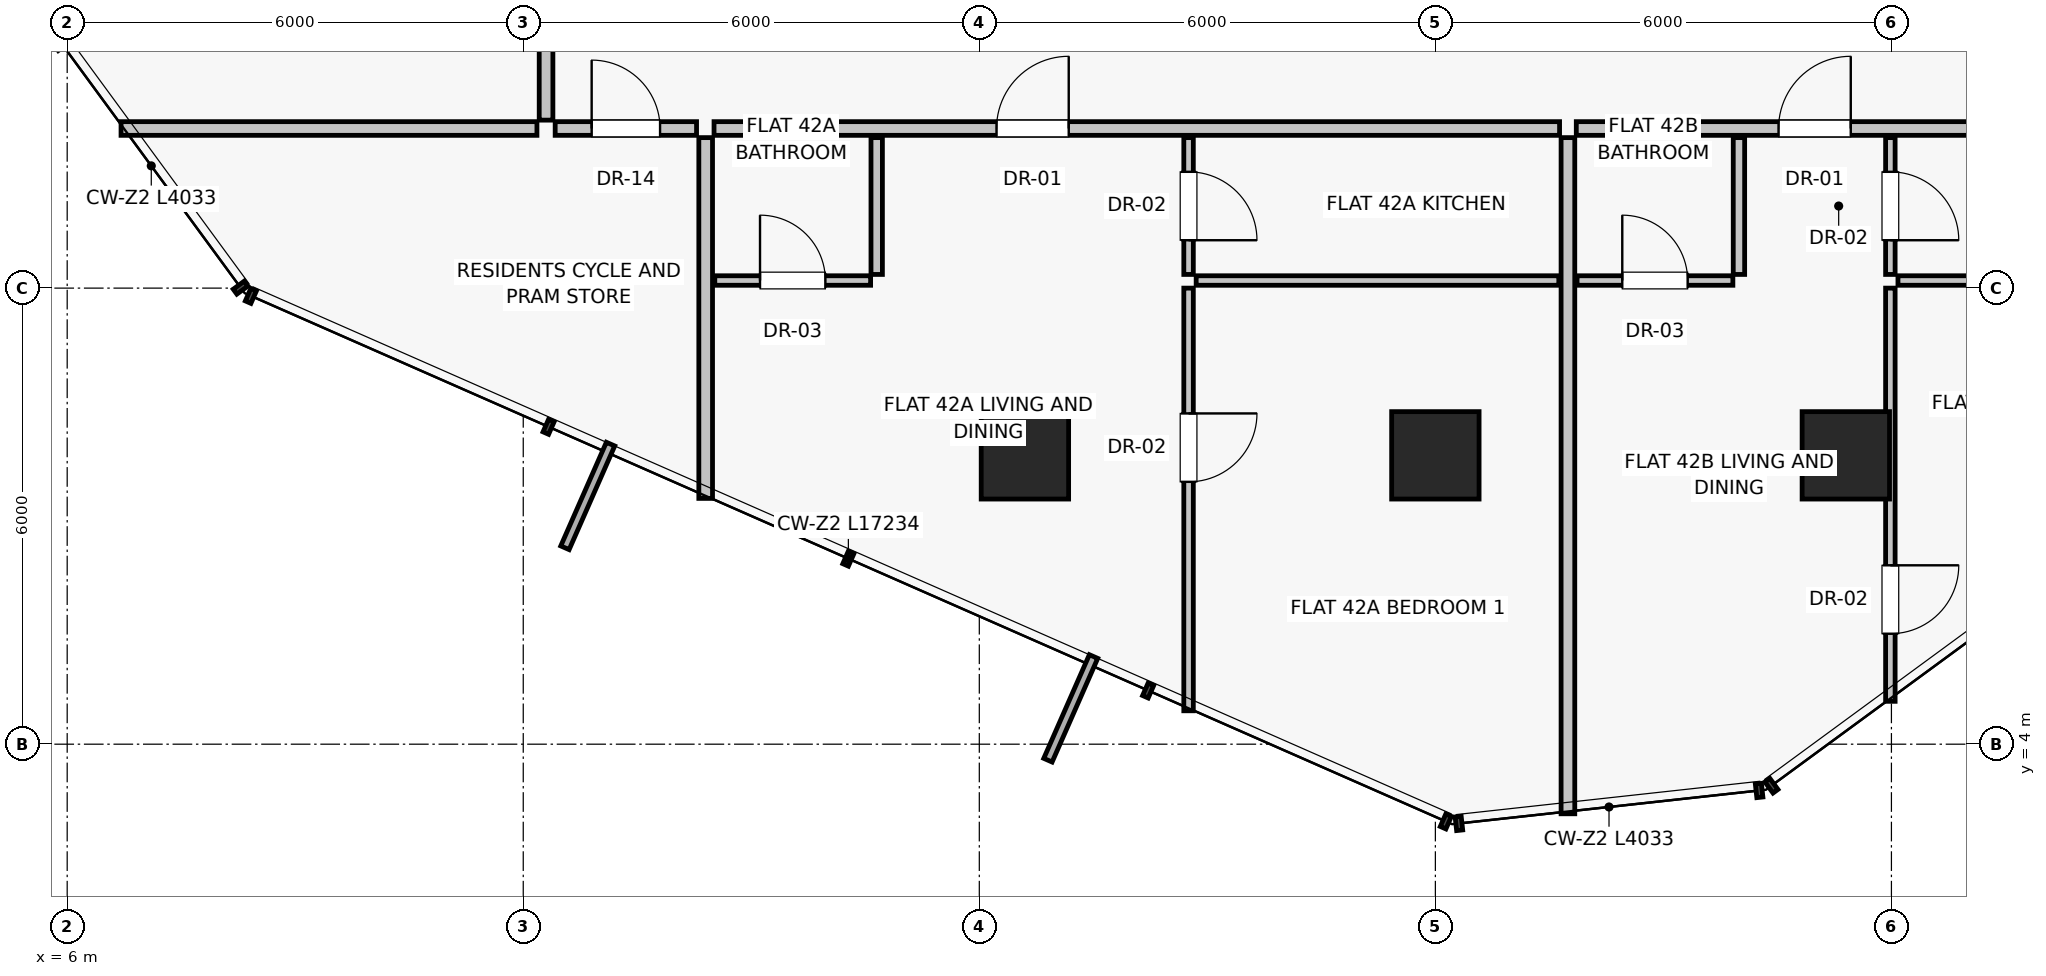
"""IFC4 building model, lengths in metres.
Left out: names, types, materials, properties, quantities, classifications, styles, units other than length and angle.
Written with IfcOpenShell. Run it as: python <this file> out.ifc"""

import sys

from ifc_helpers import new_model, si_unit, direction, frame, frame_2d, origin, origin_2d, place, context, subcontext, project, spatial, rectangle, extrude, source, transform, mapped, element, fill, save


model = new_model("IFC4")
c1 = context("Model", 3, precision=1e-05, world=origin(), true_north=direction((0.0, 1.0)))
c2 = subcontext(c1, "Body", "Model", "MODEL_VIEW")
j1 = project(units=[si_unit("LENGTHUNIT", "METRE"), si_unit("PLANEANGLEUNIT", "RADIAN")], contexts=[c1])
p1 = place(None, origin())
s1 = spatial("IfcSite", under=j1, at=p1, CompositionType="ELEMENT")
p2 = place(p1, origin())
s2 = spatial("IfcBuilding", under=s1, at=p2, CompositionType="ELEMENT")
p3 = place(p2, frame((0.0, 0.0, 149.0)))
s3 = spatial("IfcBuildingStorey", under=s2, at=p3, CompositionType="ELEMENT", Elevation=149.0)
for number, where, z_axis, x_axis in (
    (1, (18.6, 7.8, 0.0), (0.0, 0.0, 1.0), (1.0, 0.0, 0.0)),
    (2, (24.0, 7.8, 0.0), (0.0, 0.0, 1.0), (1.0, 0.0, 0.0)),
    (3, (29.4, 7.8, 0.0), (0.0, 0.0, 1.0), (1.0, 0.0, 0.0)),
):
    element("IfcColumn", number, at=place(p3, frame(where, z_axis=z_axis, x_axis=x_axis)), inside=s3, PredefinedType="COLUMN", context=c2, shape_type="SweptSolid", body=[
        extrude(rectangle(XDim=1.15, YDim=1.15, at=origin_2d()), origin(), (0.0, 0.0, 1.0), 3.25),
    ])
p4 = place(p3, frame((14.4, 11.98, 0.0), z_axis=(0.0, 0.0, 1.0), x_axis=(0.0, -1.0, 0.0)))
e4 = element("IfcWall", 4, at=p4, inside=s3, PredefinedType="PARTITIONING", context=c2, shape_type="SweptSolid", body=[
    extrude(rectangle(XDim=4.746, YDim=0.18, at=frame_2d((2.373, 0.0))), origin(), (0.0, 0.0, 1.0), 3.0),
])
p5 = place(p3, frame((14.51, 12.1, 0.0), z_axis=(0.0, 0.0, 1.0), x_axis=(1.0, 0.0, 0.0)))
e5 = element("IfcWall", 5, at=p5, inside=s3, PredefinedType="PARTITIONING", context=c2, shape_type="SweptSolid", body=[
    extrude(rectangle(XDim=11.124, YDim=0.18, at=frame_2d((5.562, 0.0))), origin(), (0.0, 0.0, 1.0), 2.58),
])
p6 = place(p5, frame((3.717, 0.0, 0.0)))
e6 = element("IfcOpeningElement", 6, at=p6, cuts=e5, PredefinedType="OPENING", context=c2, shape_type="SweptSolid", body=[
    extrude(rectangle(XDim=0.95, YDim=2.02, at=frame_2d((0.475, 1.01))), frame((0.0, 0.1, 0.0), z_axis=(0.0, -1.0, 0.0), x_axis=(1.0, 0.0, 0.0)), (0.0, 0.0, 1.0), 0.2),
])
p7 = place(p3, frame((16.65, 11.98, 0.0), z_axis=(0.0, 0.0, 1.0), x_axis=(0.0, -1.0, 0.0)))
e7 = element("IfcWall", 7, at=p7, inside=s3, PredefinedType="PARTITIONING", context=c2, shape_type="SweptSolid", body=[
    extrude(rectangle(XDim=1.8, YDim=0.15, at=frame_2d((0.9, 0.0))), origin(), (0.0, 0.0, 1.0), 3.0),
])
p8 = place(p3, frame((14.52, 10.1, 0.0), z_axis=(0.0, 0.0, 1.0), x_axis=(1.0, 0.0, 0.0)))
e8 = element("IfcWall", 8, at=p8, inside=s3, PredefinedType="PARTITIONING", context=c2, shape_type="SweptSolid", body=[
    extrude(rectangle(XDim=2.05, YDim=0.125, at=frame_2d((1.025, 0.0))), origin(), (0.0, 0.0, 1.0), 3.0),
])
p9 = place(p8, frame((0.595, 0.0, 0.0)))
e9 = element("IfcOpeningElement", 9, at=p9, cuts=e8, PredefinedType="OPENING", context=c2, shape_type="SweptSolid", body=[
    extrude(rectangle(XDim=0.86, YDim=2.01, at=frame_2d((0.43, 1.005))), frame((0.0, 0.073, 0.0), z_axis=(0.0, -1.0, 0.0), x_axis=(1.0, 0.0, 0.0)), (0.0, 0.0, 1.0), 0.145),
])
p10 = place(p3, frame((20.753, 11.98, 0.0), z_axis=(0.0, 0.0, 1.0), x_axis=(0.0, -1.0, 0.0)))
e10 = element("IfcWall", 10, at=p10, inside=s3, PredefinedType="PARTITIONING", context=c2, shape_type="SweptSolid", body=[
    extrude(rectangle(XDim=1.8, YDim=0.125, at=frame_2d((0.9, 0.0))), origin(), (0.0, 0.0, 1.0), 3.0),
])
p11 = place(p10, frame((0.45, 0.0, 0.0)))
e11 = element("IfcOpeningElement", 11, at=p11, cuts=e10, PredefinedType="OPENING", context=c2, shape_type="SweptSolid", body=[
    extrude(rectangle(XDim=0.9, YDim=2.01, at=frame_2d((0.45, 1.005))), frame((0.0, 0.073, 0.0), z_axis=(0.0, -1.0, 0.0), x_axis=(1.0, 0.0, 0.0)), (0.0, 0.0, 1.0), 0.145),
])
p12 = place(p3, frame((20.853, 10.1, 0.0), z_axis=(0.0, 0.0, 1.0), x_axis=(1.0, 0.0, 0.0)))
e12 = element("IfcWall", 12, at=p12, inside=s3, PredefinedType="PARTITIONING", context=c2, shape_type="SweptSolid", body=[
    extrude(rectangle(XDim=4.771, YDim=0.125, at=frame_2d((2.385, 0.0))), origin(), (0.0, 0.0, 1.0), 3.0),
])
p13 = place(p3, frame((20.753, 10.0, 0.0), z_axis=(0.0, 0.0, 1.0), x_axis=(0.0, -1.0, 0.0)))
e13 = element("IfcWall", 13, at=p13, inside=s3, PredefinedType="PARTITIONING", context=c2, shape_type="SweptSolid", body=[
    extrude(rectangle(XDim=5.561, YDim=0.125, at=frame_2d((2.78, 0.0))), origin(), (0.0, 0.0, 1.0), 3.0),
])
p14 = place(p13, frame((1.649, 0.0, 0.0)))
e14 = element("IfcOpeningElement", 14, at=p14, cuts=e13, PredefinedType="OPENING", context=c2, shape_type="SweptSolid", body=[
    extrude(rectangle(XDim=0.9, YDim=2.01, at=frame_2d((0.45, 1.005))), frame((0.0, 0.073, 0.0), z_axis=(0.0, -1.0, 0.0), x_axis=(1.0, 0.0, 0.0)), (0.0, 0.0, 1.0), 0.145),
])
p15 = place(p3, frame((25.744, 11.98, 0.0), z_axis=(0.0, 0.0, 1.0), x_axis=(0.0, -1.0, 0.0)))
e15 = element("IfcWall", 15, at=p15, inside=s3, PredefinedType="PARTITIONING", context=c2, shape_type="SweptSolid", body=[
    extrude(rectangle(XDim=8.896, YDim=0.18, at=frame_2d((4.448, 0.0))), origin(), (0.0, 0.0, 1.0), 3.0),
])
p16 = place(p3, frame((25.854, 12.1, 0.0), z_axis=(0.0, 0.0, 1.0), x_axis=(1.0, 0.0, 0.0)))
e16 = element("IfcWall", 16, at=p16, inside=s3, PredefinedType="PARTITIONING", context=c2, shape_type="SweptSolid", body=[
    extrude(rectangle(XDim=7.636, YDim=0.18, at=frame_2d((3.818, 0.0))), origin(), (0.0, 0.0, 1.0), 2.58),
])
p17 = place(p16, frame((2.661, 0.0, 0.0)))
e17 = element("IfcOpeningElement", 17, at=p17, cuts=e16, PredefinedType="OPENING", context=c2, shape_type="SweptSolid", body=[
    extrude(rectangle(XDim=0.95, YDim=2.02, at=frame_2d((0.475, 1.01))), frame((0.0, 0.1, 0.0), z_axis=(0.0, -1.0, 0.0), x_axis=(1.0, 0.0, 0.0)), (0.0, 0.0, 1.0), 0.2),
])
p18 = place(p3, frame((27.994, 11.98, 0.0), z_axis=(0.0, 0.0, 1.0), x_axis=(0.0, -1.0, 0.0)))
e18 = element("IfcWall", 18, at=p18, inside=s3, PredefinedType="PARTITIONING", context=c2, shape_type="SweptSolid", body=[
    extrude(rectangle(XDim=1.8, YDim=0.15, at=frame_2d((0.9, 0.0))), origin(), (0.0, 0.0, 1.0), 3.0),
])
p19 = place(p3, frame((25.864, 10.1, 0.0), z_axis=(0.0, 0.0, 1.0), x_axis=(1.0, 0.0, 0.0)))
e19 = element("IfcWall", 19, at=p19, inside=s3, PredefinedType="PARTITIONING", context=c2, shape_type="SweptSolid", body=[
    extrude(rectangle(XDim=2.05, YDim=0.125, at=frame_2d((1.025, 0.0))), origin(), (0.0, 0.0, 1.0), 3.0),
])
p20 = place(p19, frame((0.595, 0.0, 0.0)))
e20 = element("IfcOpeningElement", 20, at=p20, cuts=e19, PredefinedType="OPENING", context=c2, shape_type="SweptSolid", body=[
    extrude(rectangle(XDim=0.86, YDim=2.01, at=frame_2d((0.43, 1.005))), frame((0.0, 0.073, 0.0), z_axis=(0.0, -1.0, 0.0), x_axis=(1.0, 0.0, 0.0)), (0.0, 0.0, 1.0), 0.145),
])
p21 = place(p3, frame((29.986, 11.98, 0.0), z_axis=(0.0, 0.0, 1.0), x_axis=(0.0, -1.0, 0.0)))
e21 = element("IfcWall", 21, at=p21, inside=s3, PredefinedType="PARTITIONING", context=c2, shape_type="SweptSolid", body=[
    extrude(rectangle(XDim=1.8, YDim=0.125, at=frame_2d((0.9, 0.0))), origin(), (0.0, 0.0, 1.0), 2.378),
])
p22 = place(p21, frame((0.45, 0.0, 0.0)))
e22 = element("IfcOpeningElement", 22, at=p22, cuts=e21, PredefinedType="OPENING", context=c2, shape_type="SweptSolid", body=[
    extrude(rectangle(XDim=0.9, YDim=2.01, at=frame_2d((0.45, 1.005))), frame((0.0, 0.073, 0.0), z_axis=(0.0, -1.0, 0.0), x_axis=(1.0, 0.0, 0.0)), (0.0, 0.0, 1.0), 0.145),
])
p23 = place(p3, frame((30.086, 10.1, 0.0), z_axis=(0.0, 0.0, 1.0), x_axis=(1.0, 0.0, 0.0)))
e23 = element("IfcWall", 23, at=p23, inside=s3, PredefinedType="PARTITIONING", context=c2, shape_type="SweptSolid", body=[
    extrude(rectangle(XDim=3.394, YDim=0.125, at=frame_2d((1.697, 0.0))), origin(), (0.0, 0.0, 1.0), 3.0),
])
p24 = place(p3, frame((29.986, 10.0, 0.0), z_axis=(0.0, 0.0, 1.0), x_axis=(0.0, -1.0, 0.0)))
e24 = element("IfcWall", 24, at=p24, inside=s3, PredefinedType="PARTITIONING", context=c2, shape_type="SweptSolid", body=[
    extrude(rectangle(XDim=5.436, YDim=0.125, at=frame_2d((2.718, 0.0))), origin(), (0.0, 0.0, 1.0), 2.378),
])
p25 = place(p24, frame((3.647, 0.0, 0.0)))
e25 = element("IfcOpeningElement", 25, at=p25, cuts=e24, PredefinedType="OPENING", context=c2, shape_type="SweptSolid", body=[
    extrude(rectangle(XDim=0.9, YDim=2.01, at=frame_2d((0.45, 1.005))), frame((0.0, 0.073, 0.0), z_axis=(0.0, -1.0, 0.0), x_axis=(1.0, 0.0, 0.0)), (0.0, 0.0, 1.0), 0.145),
])
p26 = place(p3, frame((12.18, 12.1, 0.0), z_axis=(0.0, 0.0, 1.0), x_axis=(-1.0, 0.0, 0.0)))
e26 = element("IfcWall", 26, at=p26, inside=s3, PredefinedType="PARTITIONING", context=c2, shape_type="SweptSolid", body=[
    extrude(rectangle(XDim=5.471, YDim=0.18, at=frame_2d((2.736, 0.0))), origin(), (0.0, 0.0, 1.0), 3.0),
])
p27 = place(p3, frame((12.3, 12.21, 0.0), z_axis=(0.0, 0.0, 1.0), x_axis=(0.0, 1.0, 0.0)))
e27 = element("IfcWall", 27, at=p27, inside=s3, PredefinedType="PARTITIONING", context=c2, shape_type="SweptSolid", body=[
    extrude(rectangle(XDim=5.044, YDim=0.18, at=frame_2d((2.522, 0.0))), origin(), (0.0, 0.0, 1.0), 3.0),
])
p28 = place(p27, frame((2.022, 0.0, 0.0)))
e28 = element("IfcOpeningElement", 28, at=p28, cuts=e27, PredefinedType="OPENING", context=c2, shape_type="SweptSolid", body=[
    extrude(rectangle(XDim=1.0, YDim=2.01, at=frame_2d((0.5, 1.005))), frame((0.0, 0.1, 0.0), z_axis=(0.0, -1.0, 0.0), x_axis=(1.0, 0.0, 0.0)), (0.0, 0.0, 1.0), 0.2),
])
p29 = place(p3, frame((12.42, 12.1, 0.0), z_axis=(0.0, 0.0, 1.0), x_axis=(1.0, 0.0, 0.0)))
e29 = element("IfcWall", 29, at=p29, inside=s3, PredefinedType="PARTITIONING", context=c2, shape_type="SweptSolid", body=[
    extrude(rectangle(XDim=1.86, YDim=0.18, at=frame_2d((0.93, 0.0))), origin(), (0.0, 0.0, 1.0), 3.0),
])
p30 = place(p29, frame((0.48, 0.0, 0.0)))
e30 = element("IfcOpeningElement", 30, at=p30, cuts=e29, PredefinedType="OPENING", context=c2, shape_type="SweptSolid", body=[
    extrude(rectangle(XDim=0.9, YDim=2.01, at=frame_2d((0.45, 1.005))), frame((0.0, 0.1, 0.0), z_axis=(0.0, -1.0, 0.0), x_axis=(1.0, 0.0, 0.0)), (0.0, 0.0, 1.0), 0.2),
])
m1 = source(origin(), c2, "Body", "SweptSolid", [
    extrude(rectangle(XDim=0.95, YDim=2.02, at=frame_2d((0.475, 1.01))), frame((0.0, 0.025, 0.0), z_axis=(0.0, -1.0, 0.0), x_axis=(1.0, 0.0, 0.0)), (0.0, 0.0, 1.0), 0.05),
])
p31 = place(p6, origin())
e31 = element("IfcDoor", 31, at=p31, inside=s3, OperationType="SINGLE_SWING_RIGHT", PredefinedType="DOOR", context=c2, shape_type="MappedRepresentation", body=[
    mapped(m1, transform((0.0, 0.0, 0.0), scale=1.0)),
])
fill(e6, e31)
m2 = source(origin(), c2, "Body", "SweptSolid", [
    extrude(rectangle(XDim=0.86, YDim=2.01, at=frame_2d((0.43, 1.005))), frame((0.0, 0.025, 0.0), z_axis=(0.0, -1.0, 0.0), x_axis=(1.0, 0.0, 0.0)), (0.0, 0.0, 1.0), 0.05),
])
p32 = place(p9, origin())
e32 = element("IfcDoor", 32, at=p32, inside=s3, OperationType="SINGLE_SWING_LEFT", PredefinedType="DOOR", context=c2, shape_type="MappedRepresentation", body=[
    mapped(m2, transform((0.0, 0.0, 0.0), scale=1.0)),
])
fill(e9, e32)
m3 = source(origin(), c2, "Body", "SweptSolid", [
    extrude(rectangle(XDim=0.9, YDim=2.01, at=frame_2d((0.45, 1.005))), frame((0.0, 0.025, 0.0), z_axis=(0.0, -1.0, 0.0), x_axis=(1.0, 0.0, 0.0)), (0.0, 0.0, 1.0), 0.05),
])
p33 = place(p11, origin())
e33 = element("IfcDoor", 33, at=p33, inside=s3, OperationType="SINGLE_SWING_RIGHT", PredefinedType="DOOR", context=c2, shape_type="MappedRepresentation", body=[
    mapped(m3, transform((0.0, 0.0, 0.0), scale=1.0)),
])
fill(e11, e33)
p34 = place(p14, origin())
e34 = element("IfcDoor", 34, at=p34, inside=s3, OperationType="SINGLE_SWING_LEFT", PredefinedType="DOOR", context=c2, shape_type="MappedRepresentation", body=[
    mapped(m3, transform((0.0, 0.0, 0.0), scale=1.0)),
])
fill(e14, e34)
p35 = place(p17, origin())
e35 = element("IfcDoor", 35, at=p35, inside=s3, OperationType="SINGLE_SWING_RIGHT", PredefinedType="DOOR", context=c2, shape_type="MappedRepresentation", body=[
    mapped(m1, transform((0.0, 0.0, 0.0), scale=1.0)),
])
fill(e17, e35)
p36 = place(p20, origin())
e36 = element("IfcDoor", 36, at=p36, inside=s3, OperationType="SINGLE_SWING_LEFT", PredefinedType="DOOR", context=c2, shape_type="MappedRepresentation", body=[
    mapped(m2, transform((0.0, 0.0, 0.0), scale=1.0)),
])
fill(e20, e36)
p37 = place(p22, origin())
e37 = element("IfcDoor", 37, at=p37, inside=s3, OperationType="SINGLE_SWING_RIGHT", PredefinedType="DOOR", context=c2, shape_type="MappedRepresentation", body=[
    mapped(m3, transform((0.0, 0.0, 0.0), scale=1.0)),
])
fill(e22, e37)
p38 = place(p25, origin())
e38 = element("IfcDoor", 38, at=p38, inside=s3, OperationType="SINGLE_SWING_LEFT", PredefinedType="DOOR", context=c2, shape_type="MappedRepresentation", body=[
    mapped(m3, transform((0.0, 0.0, 0.0), scale=1.0)),
])
fill(e25, e38)
p39 = place(p30, origin())
e39 = element("IfcDoor", 39, at=p39, inside=s3, OperationType="SINGLE_SWING_LEFT", PredefinedType="DOOR", context=c2, shape_type="MappedRepresentation", body=[
    mapped(m3, transform((0.0, 0.0, 0.0), scale=1.0)),
])
fill(e30, e39)
save(model, sys.argv[1])
